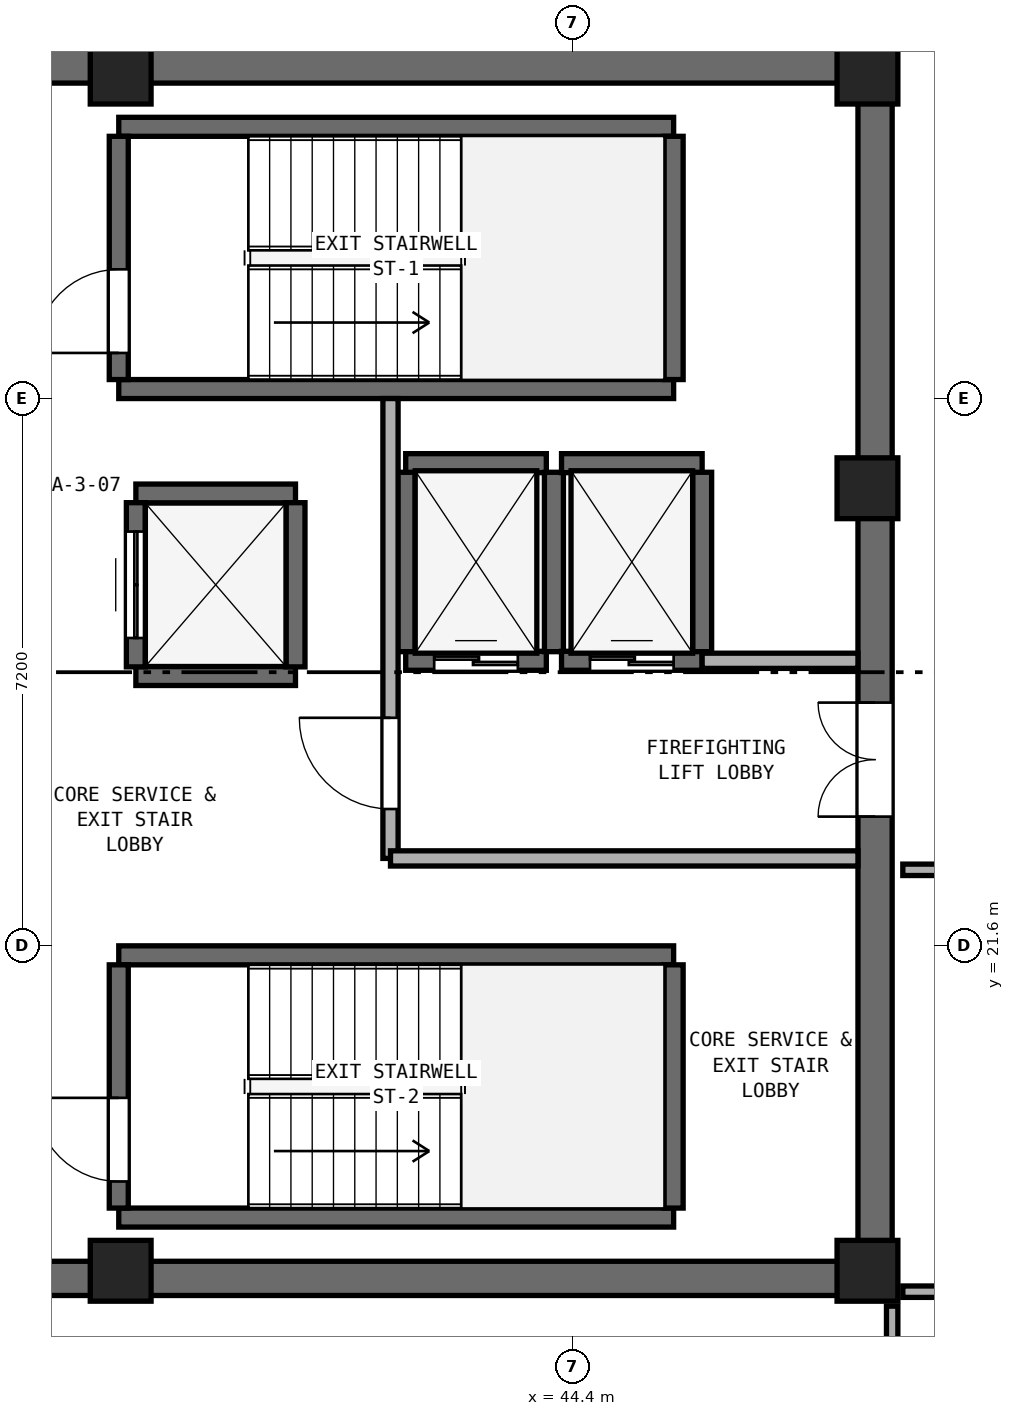
"""IFC4 building model, lengths in metres.
Left out: names, types, materials, properties, quantities, classifications, styles, units other than length and angle.
Written with IfcOpenShell. Run it as: python <this file> out.ifc"""

import sys

from ifc_helpers import new_model, si_unit, direction, frame, frame_2d, origin, origin_2d, place, context, subcontext, project, spatial, rectangle, extrude, element, fill, save


model = new_model("IFC4")
c1 = context("Model", 3, precision=1e-05, world=origin(), true_north=direction((0.0, 1.0)))
c2 = subcontext(c1, "Body", "Model", "MODEL_VIEW")
j1 = project(units=[si_unit("LENGTHUNIT", "METRE"), si_unit("PLANEANGLEUNIT", "RADIAN")], contexts=[c1])
p1 = place(None, origin())
s1 = spatial("IfcSite", under=j1, at=p1, CompositionType="ELEMENT")
p2 = place(p1, origin())
s2 = spatial("IfcBuilding", under=s1, at=p2, CompositionType="ELEMENT")
p3 = place(p2, frame((0.0, 0.0, 289.6)))
s3 = spatial("IfcBuildingStorey", under=s2, at=p3, CompositionType="ELEMENT", Elevation=289.6)
for number, where, z_axis, x_axis in (
    (1, (25.4, 17.225, 0.0), (0.0, 0.0, 1.0), (1.0, 0.0, 0.0)),
    (2, (25.4, 33.175, 0.0), (0.0, 0.0, 1.0), (1.0, 0.0, 0.0)),
):
    element("IfcWall", number, at=place(p3, frame(where, z_axis=z_axis, x_axis=x_axis)), inside=s3, PredefinedType="SHEAR", context=c2, shape_type="SweptSolid", body=[
        extrude(rectangle(XDim=23.2, YDim=0.45, at=frame_2d((11.6, 0.0))), origin(), (0.0, 0.0, 1.0), 3.54),
    ])
p4 = place(p3, frame((48.375, 17.45, 0.0), z_axis=(0.0, 0.0, 1.0), x_axis=(0.0, 1.0, 0.0)))
e3 = element("IfcWall", 3, at=p4, inside=s3, PredefinedType="SHEAR", context=c2, shape_type="SweptSolid", body=[
    extrude(rectangle(XDim=15.5, YDim=0.45, at=frame_2d((7.75, 0.0))), origin(), (0.0, 0.0, 1.0), 3.54),
])
p5 = place(p4, frame((5.85, 0.0, 0.0)))
e4 = element("IfcOpeningElement", 4, at=p5, cuts=e3, PredefinedType="OPENING", context=c2, shape_type="SweptSolid", body=[
    extrude(rectangle(XDim=1.5, YDim=2.15, at=frame_2d((0.75, 1.075))), frame((0.0, 0.235, 0.0), z_axis=(0.0, -1.0, 0.0), x_axis=(1.0, 0.0, 0.0)), (0.0, 0.0, 1.0), 0.47),
])
for number, where, z_axis, x_axis in (
    (5, (38.45, 17.325, 0.0), (0.0, 0.0, 1.0), (1.0, 0.0, 0.0)),
    (6, (48.275, 17.325, 0.0), (0.0, 0.0, 1.0), (1.0, 0.0, 0.0)),
    (7, (48.275, 27.62, 0.0), (0.0, 0.0, 1.0), (1.0, 0.0, 0.0)),
    (8, (48.275, 33.075, 0.0), (0.0, 0.0, 1.0), (1.0, 0.0, 0.0)),
    (9, (38.45, 33.075, 0.0), (0.0, 0.0, 1.0), (1.0, 0.0, 0.0)),
):
    element("IfcColumn", number, at=place(p3, frame(where, z_axis=z_axis, x_axis=x_axis)), inside=s3, PredefinedType="PILASTER", context=c2, shape_type="SweptSolid", body=[
        extrude(rectangle(XDim=0.8, YDim=0.8, at=origin_2d()), origin(), (0.0, 0.0, 1.0), 3.8),
    ])
for number, where, z_axis, x_axis in (
    (10, (38.425, 28.925, 0.0), (0.0, 0.0, 1.0), (1.0, 0.0, 0.0)),
    (11, (38.425, 32.375, 0.0), (0.0, 0.0, 1.0), (1.0, 0.0, 0.0)),
):
    element("IfcWall", number, at=place(p3, frame(where, z_axis=z_axis, x_axis=x_axis)), inside=s3, PredefinedType="SHEAR", context=c2, shape_type="SweptSolid", body=[
        extrude(rectangle(XDim=7.3, YDim=0.25, at=frame_2d((3.65, 0.0))), origin(), (0.0, 0.0, 1.0), 3.54),
    ])
p6 = place(p3, frame((38.425, 29.05, 0.0), z_axis=(0.0, 0.0, 1.0), x_axis=(0.0, 1.0, 0.0)))
e12 = element("IfcWall", 12, at=p6, inside=s3, PredefinedType="SHEAR", context=c2, shape_type="SweptSolid", body=[
    extrude(rectangle(XDim=3.2, YDim=0.25, at=frame_2d((1.6, 0.0))), origin(), (0.0, 0.0, 1.0), 3.54),
])
p7 = place(p6, frame((0.35, 0.0, 0.0)))
e13 = element("IfcOpeningElement", 13, at=p7, cuts=e12, PredefinedType="OPENING", context=c2, shape_type="SweptSolid", body=[
    extrude(rectangle(XDim=1.1, YDim=2.15, at=frame_2d((0.55, 1.075))), frame((0.0, 0.135, 0.0), z_axis=(0.0, -1.0, 0.0), x_axis=(1.0, 0.0, 0.0)), (0.0, 0.0, 1.0), 0.27),
])
p8 = place(p3, frame((45.725, 29.05, 0.0), z_axis=(0.0, 0.0, 1.0), x_axis=(0.0, 1.0, 0.0)))
e14 = element("IfcWall", 14, at=p8, inside=s3, PredefinedType="SHEAR", context=c2, shape_type="SweptSolid", body=[
    extrude(rectangle(XDim=3.2, YDim=0.25, at=frame_2d((1.6, 0.0))), origin(), (0.0, 0.0, 1.0), 3.54),
])
for number, where, z_axis, x_axis in (
    (15, (38.425, 18.025, 0.0), (0.0, 0.0, 1.0), (1.0, 0.0, 0.0)),
    (16, (38.425, 21.475, 0.0), (0.0, 0.0, 1.0), (1.0, 0.0, 0.0)),
):
    element("IfcWall", number, at=place(p3, frame(where, z_axis=z_axis, x_axis=x_axis)), inside=s3, PredefinedType="SHEAR", context=c2, shape_type="SweptSolid", body=[
        extrude(rectangle(XDim=7.3, YDim=0.25, at=frame_2d((3.65, 0.0))), origin(), (0.0, 0.0, 1.0), 3.54),
    ])
p9 = place(p3, frame((38.425, 18.15, 0.0), z_axis=(0.0, 0.0, 1.0), x_axis=(0.0, 1.0, 0.0)))
e17 = element("IfcWall", 17, at=p9, inside=s3, PredefinedType="SHEAR", context=c2, shape_type="SweptSolid", body=[
    extrude(rectangle(XDim=3.2, YDim=0.25, at=frame_2d((1.6, 0.0))), origin(), (0.0, 0.0, 1.0), 3.54),
])
p10 = place(p9, frame((0.35, 0.0, 0.0)))
e18 = element("IfcOpeningElement", 18, at=p10, cuts=e17, PredefinedType="OPENING", context=c2, shape_type="SweptSolid", body=[
    extrude(rectangle(XDim=1.1, YDim=2.15, at=frame_2d((0.55, 1.075))), frame((0.0, 0.135, 0.0), z_axis=(0.0, -1.0, 0.0), x_axis=(1.0, 0.0, 0.0)), (0.0, 0.0, 1.0), 0.27),
])
p11 = place(p3, frame((45.725, 18.15, 0.0), z_axis=(0.0, 0.0, 1.0), x_axis=(0.0, 1.0, 0.0)))
e19 = element("IfcWall", 19, at=p11, inside=s3, PredefinedType="SHEAR", context=c2, shape_type="SweptSolid", body=[
    extrude(rectangle(XDim=3.2, YDim=0.25, at=frame_2d((1.6, 0.0))), origin(), (0.0, 0.0, 1.0), 3.54),
])
p12 = place(p3, frame((42.2, 25.35, 0.0), z_axis=(0.0, 0.0, 1.0), x_axis=(1.0, 0.0, 0.0)))
e20 = element("IfcWall", 20, at=p12, inside=s3, PredefinedType="SHEAR", context=c2, shape_type="SweptSolid", body=[
    extrude(rectangle(XDim=1.85, YDim=0.25, at=frame_2d((0.925, 0.0))), origin(), (0.0, 0.0, 1.0), 3.54),
])
p13 = place(p12, frame((0.375, 0.0, 0.0)))
e21 = element("IfcOpeningElement", 21, at=p13, cuts=e20, PredefinedType="OPENING", context=c2, shape_type="SweptSolid", body=[
    extrude(rectangle(XDim=1.1, YDim=2.15, at=frame_2d((0.55, 1.075))), frame((0.0, 0.135, 0.0), z_axis=(0.0, -1.0, 0.0), x_axis=(1.0, 0.0, 0.0)), (0.0, 0.0, 1.0), 0.27),
])
p14 = place(p3, frame((42.2, 27.95, 0.0), z_axis=(0.0, 0.0, 1.0), x_axis=(1.0, 0.0, 0.0)))
e22 = element("IfcWall", 22, at=p14, inside=s3, PredefinedType="SHEAR", context=c2, shape_type="SweptSolid", body=[
    extrude(rectangle(XDim=1.85, YDim=0.25, at=frame_2d((0.925, 0.0))), origin(), (0.0, 0.0, 1.0), 3.54),
])
for number, where, z_axis, x_axis in (
    (23, (42.2, 25.47, 0.0), (0.0, 0.0, 1.0), (0.0, 1.0, 0.0)),
    (24, (44.15, 25.47, 0.0), (0.0, 0.0, 1.0), (0.0, 1.0, 0.0)),
):
    element("IfcWall", number, at=place(p3, frame(where, z_axis=z_axis, x_axis=x_axis)), inside=s3, PredefinedType="SHEAR", context=c2, shape_type="SweptSolid", body=[
        extrude(rectangle(XDim=2.36, YDim=0.25, at=frame_2d((1.18, 0.0))), origin(), (0.0, 0.0, 1.0), 3.54),
    ])
p15 = place(p3, frame((44.25, 25.35, 0.0), z_axis=(0.0, 0.0, 1.0), x_axis=(1.0, 0.0, 0.0)))
e25 = element("IfcWall", 25, at=p15, inside=s3, PredefinedType="SHEAR", context=c2, shape_type="SweptSolid", body=[
    extrude(rectangle(XDim=1.85, YDim=0.25, at=frame_2d((0.925, 0.0))), origin(), (0.0, 0.0, 1.0), 3.54),
])
p16 = place(p15, frame((0.375, 0.0, 0.0)))
e26 = element("IfcOpeningElement", 26, at=p16, cuts=e25, PredefinedType="OPENING", context=c2, shape_type="SweptSolid", body=[
    extrude(rectangle(XDim=1.1, YDim=2.15, at=frame_2d((0.55, 1.075))), frame((0.0, 0.135, 0.0), z_axis=(0.0, -1.0, 0.0), x_axis=(1.0, 0.0, 0.0)), (0.0, 0.0, 1.0), 0.27),
])
p17 = place(p3, frame((44.25, 27.95, 0.0), z_axis=(0.0, 0.0, 1.0), x_axis=(1.0, 0.0, 0.0)))
e27 = element("IfcWall", 27, at=p17, inside=s3, PredefinedType="SHEAR", context=c2, shape_type="SweptSolid", body=[
    extrude(rectangle(XDim=1.85, YDim=0.25, at=frame_2d((0.925, 0.0))), origin(), (0.0, 0.0, 1.0), 3.54),
])
p18 = place(p3, frame((46.1, 25.47, 0.0), z_axis=(0.0, 0.0, 1.0), x_axis=(0.0, 1.0, 0.0)))
e28 = element("IfcWall", 28, at=p18, inside=s3, PredefinedType="SHEAR", context=c2, shape_type="SweptSolid", body=[
    extrude(rectangle(XDim=2.36, YDim=0.25, at=frame_2d((1.18, 0.0))), origin(), (0.0, 0.0, 1.0), 3.54),
])
for number, where, z_axis, x_axis in (
    (29, (38.65, 25.15, 0.0), (0.0, 0.0, 1.0), (1.0, 0.0, 0.0)),
    (30, (38.65, 27.55, 0.0), (0.0, 0.0, 1.0), (1.0, 0.0, 0.0)),
):
    element("IfcWall", number, at=place(p3, frame(where, z_axis=z_axis, x_axis=x_axis)), inside=s3, PredefinedType="SHEAR", context=c2, shape_type="SweptSolid", body=[
        extrude(rectangle(XDim=2.1, YDim=0.25, at=frame_2d((1.05, 0.0))), origin(), (0.0, 0.0, 1.0), 3.54),
    ])
p19 = place(p3, frame((38.65, 25.27, 0.0), z_axis=(0.0, 0.0, 1.0), x_axis=(0.0, 1.0, 0.0)))
e31 = element("IfcWall", 31, at=p19, inside=s3, PredefinedType="SHEAR", context=c2, shape_type="SweptSolid", body=[
    extrude(rectangle(XDim=2.16, YDim=0.25, at=frame_2d((1.08, 0.0))), origin(), (0.0, 0.0, 1.0), 3.54),
])
p20 = place(p19, frame((0.38, 0.0, 0.0)))
e32 = element("IfcOpeningElement", 32, at=p20, cuts=e31, PredefinedType="OPENING", context=c2, shape_type="SweptSolid", body=[
    extrude(rectangle(XDim=1.4, YDim=2.2, at=frame_2d((0.7, 1.1))), frame((0.0, 0.135, 0.0), z_axis=(0.0, -1.0, 0.0), x_axis=(1.0, 0.0, 0.0)), (0.0, 0.0, 1.0), 0.27),
])
p21 = place(p3, frame((40.75, 25.27, 0.0), z_axis=(0.0, 0.0, 1.0), x_axis=(0.0, 1.0, 0.0)))
e33 = element("IfcWall", 33, at=p21, inside=s3, PredefinedType="SHEAR", context=c2, shape_type="SweptSolid", body=[
    extrude(rectangle(XDim=2.16, YDim=0.25, at=frame_2d((1.08, 0.0))), origin(), (0.0, 0.0, 1.0), 3.54),
])
p22 = place(p3, frame((42.0, 22.75, 0.0), z_axis=(0.0, 0.0, 1.0), x_axis=(0.0, 1.0, 0.0)))
e34 = element("IfcWall", 34, at=p22, inside=s3, PredefinedType="SOLIDWALL", context=c2, shape_type="SweptSolid", body=[
    extrude(rectangle(XDim=6.05, YDim=0.2, at=frame_2d((3.025, 0.0))), origin(), (0.0, 0.0, 1.0), 3.54),
])
p23 = place(p22, frame((0.65, 0.0, 0.0)))
e35 = element("IfcOpeningElement", 35, at=p23, cuts=e34, PredefinedType="OPENING", context=c2, shape_type="SweptSolid", body=[
    extrude(rectangle(XDim=1.2, YDim=2.15, at=frame_2d((0.6, 1.075))), frame((0.0, 0.11, 0.0), z_axis=(0.0, -1.0, 0.0), x_axis=(1.0, 0.0, 0.0)), (0.0, 0.0, 1.0), 0.22),
])
p24 = place(p3, frame((42.0, 22.75, 0.0), z_axis=(0.0, 0.0, 1.0), x_axis=(1.0, 0.0, 0.0)))
e36 = element("IfcWall", 36, at=p24, inside=s3, PredefinedType="SOLIDWALL", context=c2, shape_type="SweptSolid", body=[
    extrude(rectangle(XDim=6.15, YDim=0.2, at=frame_2d((3.075, 0.0))), origin(), (0.0, 0.0, 1.0), 3.54),
])
p25 = place(p3, frame((46.1, 25.35, 0.0), z_axis=(0.0, 0.0, 1.0), x_axis=(1.0, 0.0, 0.0)))
e37 = element("IfcWall", 37, at=p25, inside=s3, PredefinedType="SOLIDWALL", context=c2, shape_type="SweptSolid", body=[
    extrude(rectangle(XDim=2.05, YDim=0.2, at=frame_2d((1.025, 0.0))), origin(), (0.0, 0.0, 1.0), 3.54),
])
p26 = place(p3, frame((48.6, 13.4, 0.0), z_axis=(0.0, 0.0, 1.0), x_axis=(0.0, 1.0, 0.0)))
e38 = element("IfcWall", 38, at=p26, inside=s3, PredefinedType="PARTITIONING", context=c2, shape_type="SweptSolid", body=[
    extrude(rectangle(XDim=3.46, YDim=0.15, at=frame_2d((1.73, 0.0))), origin(), (0.0, 0.0, 1.0), 3.54),
])
p27 = place(p3, frame((48.74, 17.05, 0.0), z_axis=(0.0, 0.0, 1.0), x_axis=(1.0, 0.0, 0.0)))
e39 = element("IfcWall", 39, at=p27, inside=s3, PredefinedType="PARTITIONING", context=c2, shape_type="SweptSolid", body=[
    extrude(rectangle(XDim=13.655, YDim=0.15, at=frame_2d((6.828, 0.0))), origin(), (0.0, 0.0, 1.0), 2.923),
])
p28 = place(p3, frame((48.74, 22.6, 0.0), z_axis=(0.0, 0.0, 1.0), x_axis=(1.0, 0.0, 0.0)))
e40 = element("IfcWall", 40, at=p28, inside=s3, PredefinedType="PARTITIONING", context=c2, shape_type="SweptSolid", body=[
    extrude(rectangle(XDim=3.46, YDim=0.15, at=frame_2d((1.73, 0.0))), origin(), (0.0, 0.0, 1.0), 3.54),
])
p29 = place(p7, origin())
e41 = element("IfcDoor", 41, at=p29, inside=s3, OperationType="SINGLE_SWING_LEFT", PredefinedType="DOOR", context=c2, shape_type="SweptSolid", body=[
    extrude(rectangle(XDim=1.1, YDim=2.15, at=frame_2d((0.55, 1.075))), frame((0.0, 0.025, 0.0), z_axis=(0.0, -1.0, 0.0), x_axis=(1.0, 0.0, 0.0)), (0.0, 0.0, 1.0), 0.05),
])
fill(e13, e41)
p30 = place(p10, origin())
e42 = element("IfcDoor", 42, at=p30, inside=s3, OperationType="SINGLE_SWING_RIGHT", PredefinedType="DOOR", context=c2, shape_type="SweptSolid", body=[
    extrude(rectangle(XDim=1.1, YDim=2.15, at=frame_2d((0.55, 1.075))), frame((0.0, 0.025, 0.0), z_axis=(0.0, -1.0, 0.0), x_axis=(1.0, 0.0, 0.0)), (0.0, 0.0, 1.0), 0.05),
])
fill(e18, e42)
p31 = place(p13, origin())
e43 = element("IfcDoor", 43, at=p31, inside=s3, OperationType="DOUBLE_DOOR_SLIDING", PredefinedType="DOOR", context=c2, shape_type="SweptSolid", body=[
    extrude(rectangle(XDim=1.1, YDim=2.15, at=frame_2d((0.55, 1.075))), frame((0.0, 0.025, 0.0), z_axis=(0.0, -1.0, 0.0), x_axis=(1.0, 0.0, 0.0)), (0.0, 0.0, 1.0), 0.05),
])
fill(e21, e43)
p32 = place(p16, origin())
e44 = element("IfcDoor", 44, at=p32, inside=s3, OperationType="DOUBLE_DOOR_SLIDING", PredefinedType="DOOR", context=c2, shape_type="SweptSolid", body=[
    extrude(rectangle(XDim=1.1, YDim=2.15, at=frame_2d((0.55, 1.075))), frame((0.0, 0.025, 0.0), z_axis=(0.0, -1.0, 0.0), x_axis=(1.0, 0.0, 0.0)), (0.0, 0.0, 1.0), 0.05),
])
fill(e26, e44)
p33 = place(p20, origin())
e45 = element("IfcDoor", 45, at=p33, inside=s3, OperationType="DOUBLE_DOOR_SLIDING", PredefinedType="DOOR", context=c2, shape_type="SweptSolid", body=[
    extrude(rectangle(XDim=1.4, YDim=2.2, at=frame_2d((0.7, 1.1))), frame((0.0, 0.025, 0.0), z_axis=(0.0, -1.0, 0.0), x_axis=(1.0, 0.0, 0.0)), (0.0, 0.0, 1.0), 0.05),
])
fill(e32, e45)
p34 = place(p23, origin())
e46 = element("IfcDoor", 46, at=p34, inside=s3, OperationType="SINGLE_SWING_RIGHT", PredefinedType="DOOR", context=c2, shape_type="SweptSolid", body=[
    extrude(rectangle(XDim=1.2, YDim=2.15, at=frame_2d((0.6, 1.075))), frame((0.0, 0.025, 0.0), z_axis=(0.0, -1.0, 0.0), x_axis=(1.0, 0.0, 0.0)), (0.0, 0.0, 1.0), 0.05),
])
fill(e35, e46)
p35 = place(p5, origin())
e47 = element("IfcDoor", 47, at=p35, inside=s3, OperationType="DOUBLE_DOOR_SINGLE_SWING", PredefinedType="DOOR", context=c2, shape_type="SweptSolid", body=[
    extrude(rectangle(XDim=1.5, YDim=2.15, at=frame_2d((0.75, 1.075))), frame((0.0, 0.025, 0.0), z_axis=(0.0, -1.0, 0.0), x_axis=(1.0, 0.0, 0.0)), (0.0, 0.0, 1.0), 0.05),
])
fill(e4, e47)
save(model, sys.argv[1])
